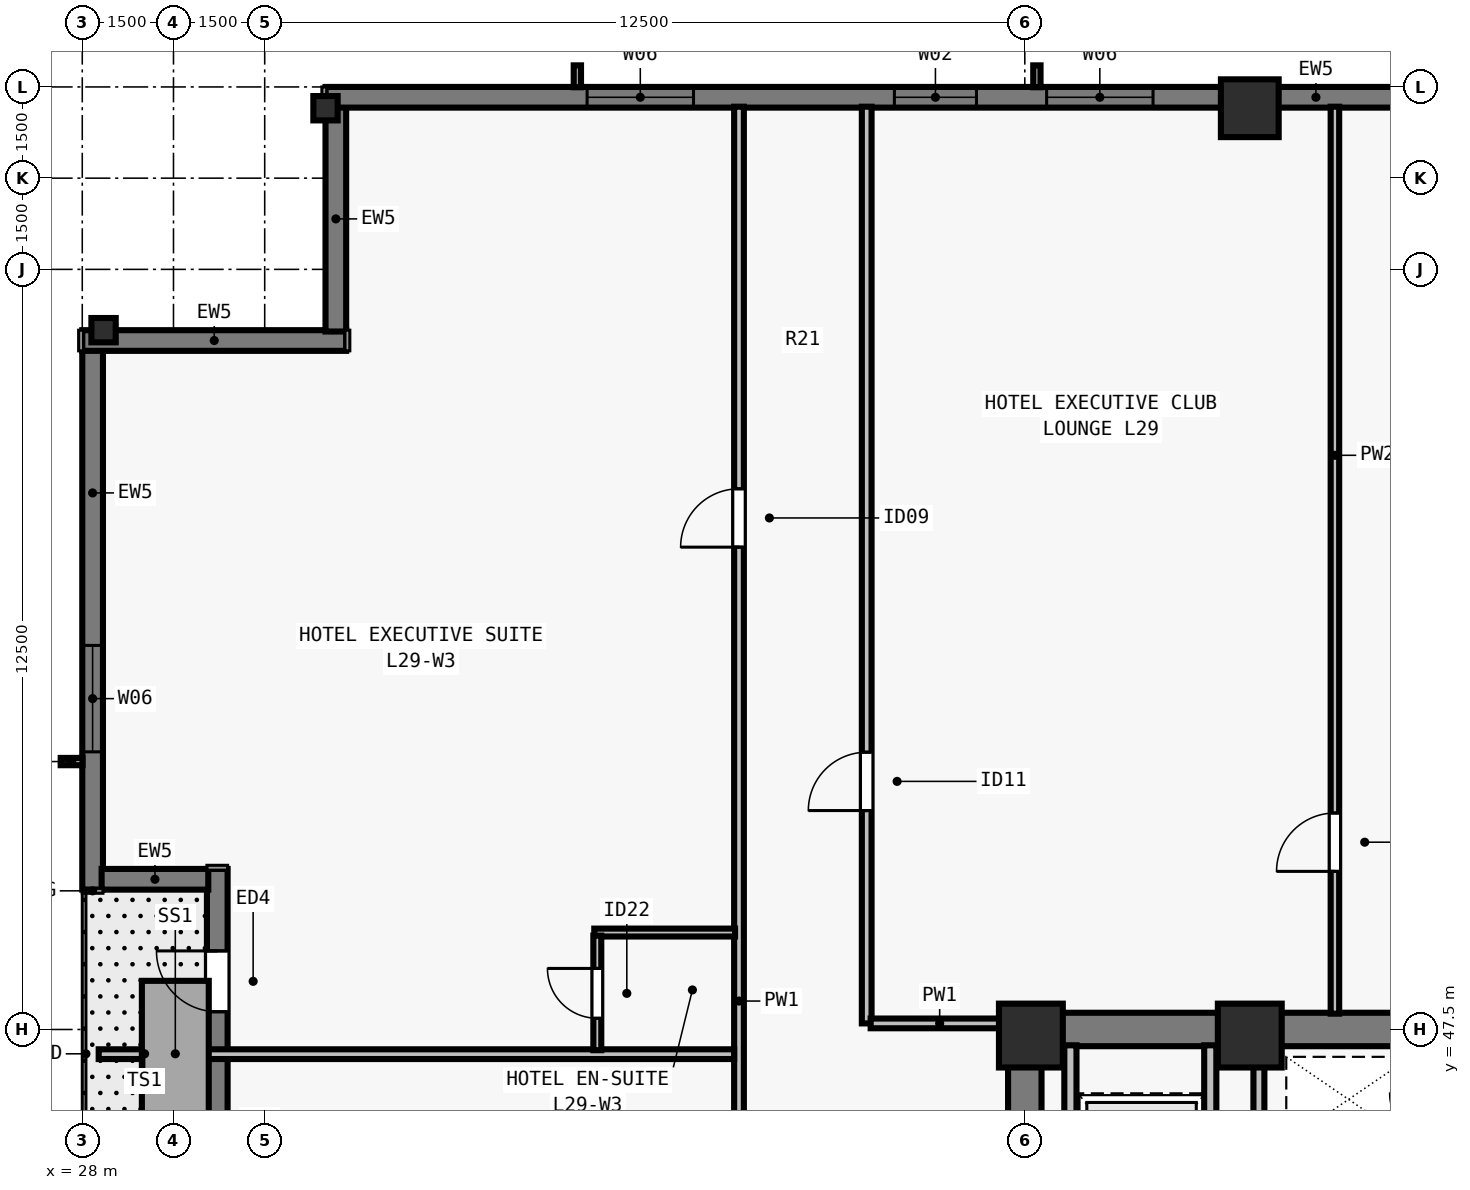
"""IFC4 building model, lengths in metres.
Left out: names, types, materials, properties, quantities, classifications, styles, units other than length and angle.
Written with IfcOpenShell. Run it as: python <this file> out.ifc"""

import sys

from ifc_helpers import new_model, si_unit, direction, frame, frame_2d, origin, origin_2d, place, context, subcontext, project, spatial, rectangle, i_section, extrude, element, fill, save


model = new_model("IFC4")
c1 = context("Model", 3, precision=1e-05, world=origin(), true_north=direction((0.0, 1.0)))
c2 = subcontext(c1, "Body", "Model", "MODEL_VIEW")
j1 = project(units=[si_unit("LENGTHUNIT", "METRE"), si_unit("PLANEANGLEUNIT", "RADIAN")], contexts=[c1])
p1 = place(None, origin())
s1 = spatial("IfcSite", under=j1, at=p1, CompositionType="ELEMENT")
p2 = place(p1, origin())
s2 = spatial("IfcBuilding", under=s1, at=p2, CompositionType="ELEMENT")
p3 = place(p2, frame((0.0, 0.0, 109.5)))
s3 = spatial("IfcBuildingStorey", under=s2, at=p3, CompositionType="ELEMENT", Elevation=109.5)
for number, where, z_axis, x_axis in (
    (1, (43.6, 47.4, 0.0), (0.0, 0.0, 1.0), (1.0, 0.0, 0.0)),
    (2, (47.2, 47.4, 0.0), (0.0, 0.0, 1.0), (1.0, 0.0, 0.0)),
):
    element("IfcColumn", number, at=place(p3, frame(where, z_axis=z_axis, x_axis=x_axis)), inside=s3, PredefinedType="COLUMN", context=c2, shape_type="SweptSolid", body=[
        extrude(rectangle(XDim=1.05, YDim=1.05, at=origin_2d()), origin(), (0.0, 0.0, 1.0), 3.5),
    ])
p4 = place(p3, frame((47.2, 62.65, 0.0), z_axis=(0.0, 0.0, 1.0), x_axis=(1.0, 0.0, 0.0)))
e3 = element("IfcColumn", 3, at=p4, inside=s3, PredefinedType="COLUMN", context=c2, shape_type="SweptSolid", body=[
    extrude(rectangle(XDim=0.95, YDim=0.95, at=origin_2d()), origin(), (0.0, 0.0, 1.0), 3.5),
])
for number, where, z_axis, x_axis in (
    (4, (32.0, 62.65, 0.0), (0.0, 0.0, 1.0), (1.0, 0.0, 0.0)),
    (5, (28.35, 59.0, 0.0), (0.0, 0.0, 1.0), (0.0, 1.0, 0.0)),
):
    element("IfcColumn", number, at=place(p3, frame(where, z_axis=z_axis, x_axis=x_axis)), inside=s3, PredefinedType="COLUMN", context=c2, shape_type="SweptSolid", body=[
        extrude(i_section(OverallWidth=0.4, OverallDepth=0.4, WebThickness=0.022, FlangeThickness=0.036, at=origin_2d()), origin(), (0.0, 0.0, 1.0), 3.5),
    ])
p5 = place(p3, frame((28.17, 49.8, 0.0), z_axis=(0.0, 0.0, 1.0), x_axis=(0.0, 1.0, 0.0)))
e6 = element("IfcWall", 6, at=p5, inside=s3, PredefinedType="SOLIDWALL", context=c2, shape_type="SweptSolid", body=[
    extrude(rectangle(XDim=8.882, YDim=0.34, at=frame_2d((4.441, 0.0))), origin(), (0.0, 0.0, 1.0), 3.28),
])
p6 = place(p5, frame((2.266, 0.0, 0.8)))
e7 = element("IfcOpeningElement", 7, at=p6, cuts=e6, PredefinedType="OPENING", context=c2, shape_type="SweptSolid", body=[
    extrude(rectangle(XDim=1.75, YDim=1.66, at=frame_2d((0.875, 0.83))), frame((0.0, 0.18, 0.0), z_axis=(0.0, -1.0, 0.0), x_axis=(1.0, 0.0, 0.0)), (0.0, 0.0, 1.0), 0.36),
])
p7 = place(p3, frame((28.0, 58.83, 0.0), z_axis=(0.0, 0.0, 1.0), x_axis=(1.0, 0.0, 0.0)))
e8 = element("IfcWall", 8, at=p7, inside=s3, PredefinedType="SOLIDWALL", context=c2, shape_type="SweptSolid", body=[
    extrude(rectangle(XDim=4.34, YDim=0.34, at=frame_2d((2.17, 0.0))), origin(), (0.0, 0.0, 1.0), 3.28),
])
p8 = place(p3, frame((32.17, 58.978, 0.0), z_axis=(0.0, 0.0, 1.0), x_axis=(0.0, 1.0, 0.0)))
e9 = element("IfcWall", 9, at=p8, inside=s3, PredefinedType="SOLIDWALL", context=c2, shape_type="SweptSolid", body=[
    extrude(rectangle(XDim=3.704, YDim=0.34, at=frame_2d((1.852, 0.0))), origin(), (0.0, 0.0, 1.0), 3.28),
])
p9 = place(p3, frame((32.0, 62.83, 0.0), z_axis=(0.0, 0.0, 1.0), x_axis=(1.0, 0.0, 0.0)))
e10 = element("IfcWall", 10, at=p9, inside=s3, PredefinedType="SOLIDWALL", context=c2, shape_type="SweptSolid", body=[
    extrude(rectangle(XDim=39.682, YDim=0.34, at=frame_2d((19.841, 0.0))), origin(), (0.0, 0.0, 1.0), 3.28),
])
p10 = place(p9, frame((4.302, 0.0, 0.8)))
e11 = element("IfcOpeningElement", 11, at=p10, cuts=e10, PredefinedType="OPENING", context=c2, shape_type="SweptSolid", body=[
    extrude(rectangle(XDim=1.75, YDim=1.66, at=frame_2d((0.875, 0.83))), frame((0.0, 0.18, 0.0), z_axis=(0.0, -1.0, 0.0), x_axis=(1.0, 0.0, 0.0)), (0.0, 0.0, 1.0), 0.36),
])
p11 = place(p9, frame((9.355, 0.0, 0.8)))
e12 = element("IfcOpeningElement", 12, at=p11, cuts=e10, PredefinedType="OPENING", context=c2, shape_type="SweptSolid", body=[
    extrude(rectangle(XDim=1.35, YDim=1.66, at=frame_2d((0.675, 0.83))), frame((0.0, 0.18, 0.0), z_axis=(0.0, -1.0, 0.0), x_axis=(1.0, 0.0, 0.0)), (0.0, 0.0, 1.0), 0.36),
])
p12 = place(p9, frame((11.859, 0.0, 0.8)))
e13 = element("IfcOpeningElement", 13, at=p12, cuts=e10, PredefinedType="OPENING", context=c2, shape_type="SweptSolid", body=[
    extrude(rectangle(XDim=1.75, YDim=1.66, at=frame_2d((0.875, 0.83))), frame((0.0, 0.18, 0.0), z_axis=(0.0, -1.0, 0.0), x_axis=(1.0, 0.0, 0.0)), (0.0, 0.0, 1.0), 0.36),
])
p13 = place(p9, frame((18.966, 0.0, 0.8)))
e14 = element("IfcOpeningElement", 14, at=p13, cuts=e10, PredefinedType="OPENING", context=c2, shape_type="SweptSolid", body=[
    extrude(rectangle(XDim=1.75, YDim=1.66, at=frame_2d((0.875, 0.83))), frame((0.0, 0.18, 0.0), z_axis=(0.0, -1.0, 0.0), x_axis=(1.0, 0.0, 0.0)), (0.0, 0.0, 1.0), 0.36),
])
p14 = place(p9, frame((21.469, 0.0, 0.8)))
e15 = element("IfcOpeningElement", 15, at=p14, cuts=e10, PredefinedType="OPENING", context=c2, shape_type="SweptSolid", body=[
    extrude(rectangle(XDim=1.35, YDim=1.66, at=frame_2d((0.675, 0.83))), frame((0.0, 0.18, 0.0), z_axis=(0.0, -1.0, 0.0), x_axis=(1.0, 0.0, 0.0)), (0.0, 0.0, 1.0), 0.36),
])
p15 = place(p9, frame((26.073, 0.0, 0.8)))
e16 = element("IfcOpeningElement", 16, at=p15, cuts=e10, PredefinedType="OPENING", context=c2, shape_type="SweptSolid", body=[
    extrude(rectangle(XDim=1.75, YDim=1.66, at=frame_2d((0.875, 0.83))), frame((0.0, 0.18, 0.0), z_axis=(0.0, -1.0, 0.0), x_axis=(1.0, 0.0, 0.0)), (0.0, 0.0, 1.0), 0.36),
])
p16 = place(p9, frame((29.377, 0.0, 0.8)))
e17 = element("IfcOpeningElement", 17, at=p16, cuts=e10, PredefinedType="OPENING", context=c2, shape_type="SweptSolid", body=[
    extrude(rectangle(XDim=1.35, YDim=1.66, at=frame_2d((0.675, 0.83))), frame((0.0, 0.18, 0.0), z_axis=(0.0, -1.0, 0.0), x_axis=(1.0, 0.0, 0.0)), (0.0, 0.0, 1.0), 0.36),
])
p17 = place(p9, frame((33.63, 0.0, 0.8)))
e18 = element("IfcOpeningElement", 18, at=p17, cuts=e10, PredefinedType="OPENING", context=c2, shape_type="SweptSolid", body=[
    extrude(rectangle(XDim=1.75, YDim=1.66, at=frame_2d((0.875, 0.83))), frame((0.0, 0.18, 0.0), z_axis=(0.0, -1.0, 0.0), x_axis=(1.0, 0.0, 0.0)), (0.0, 0.0, 1.0), 0.36),
])
p18 = place(p3, frame((30.22, 44.378, 0.0), z_axis=(0.0, 0.0, 1.0), x_axis=(0.0, 1.0, 0.0)))
e19 = element("IfcWall", 19, at=p18, inside=s3, PredefinedType="SOLIDWALL", context=c2, shape_type="SweptSolid", body=[
    extrude(rectangle(XDim=5.762, YDim=0.34, at=frame_2d((2.881, 0.0))), origin(), (0.0, 0.0, 1.0), 3.28),
])
p19 = place(p18, frame((3.414, 0.0, 0.0)))
e20 = element("IfcOpeningElement", 20, at=p19, cuts=e19, PredefinedType="OPENING", context=c2, shape_type="SweptSolid", body=[
    extrude(rectangle(XDim=1.0, YDim=2.15, at=frame_2d((0.5, 1.075))), frame((0.0, 0.18, 0.0), z_axis=(0.0, -1.0, 0.0), x_axis=(1.0, 0.0, 0.0)), (0.0, 0.0, 1.0), 0.36),
])
p20 = place(p3, frame((30.072, 49.97, 0.0), z_axis=(0.0, 0.0, 1.0), x_axis=(-1.0, 0.0, 0.0)))
e21 = element("IfcWall", 21, at=p20, inside=s3, PredefinedType="SOLIDWALL", context=c2, shape_type="SweptSolid", body=[
    extrude(rectangle(XDim=1.754, YDim=0.34, at=frame_2d((0.877, 0.0))), origin(), (0.0, 0.0, 1.0), 3.28),
])
p21 = place(p3, frame((43.225, 47.5, 0.0), z_axis=(0.0, 0.0, 1.0), x_axis=(1.0, 0.0, 0.0)))
e22 = element("IfcWall", 22, at=p21, inside=s3, PredefinedType="SHEAR", context=c2, shape_type="SweptSolid", body=[
    extrude(rectangle(XDim=17.55, YDim=0.55, at=frame_2d((8.775, 0.0))), origin(), (0.0, 0.0, 1.0), 3.28),
])
p22 = place(p3, frame((43.5, 40.8, 0.0), z_axis=(0.0, 0.0, 1.0), x_axis=(0.0, 1.0, 0.0)))
e23 = element("IfcWall", 23, at=p22, inside=s3, PredefinedType="SHEAR", context=c2, shape_type="SweptSolid", body=[
    extrude(rectangle(XDim=6.435, YDim=0.55, at=frame_2d((3.218, 0.0))), origin(), (0.0, 0.0, 1.0), 3.28),
])
for number, where, z_axis, x_axis in (
    (24, (46.55, 43.735, 0.0), (0.0, 0.0, 1.0), (0.0, 1.0, 0.0)),
    (25, (44.25, 43.735, 0.0), (0.0, 0.0, 1.0), (0.0, 1.0, 0.0)),
):
    element("IfcWall", number, at=place(p3, frame(where, z_axis=z_axis, x_axis=x_axis)), inside=s3, PredefinedType="SOLIDWALL", context=c2, shape_type="SweptSolid", body=[
        extrude(rectangle(XDim=3.505, YDim=0.2, at=frame_2d((1.752, 0.0))), origin(), (0.0, 0.0, 1.0), 3.28),
    ])
p23 = place(p3, frame((47.35, 43.735, 0.0), z_axis=(0.0, 0.0, 1.0), x_axis=(0.0, 1.0, 0.0)))
e26 = element("IfcWall", 26, at=p23, inside=s3, PredefinedType="SOLIDWALL", context=c2, shape_type="SweptSolid", body=[
    extrude(rectangle(XDim=3.505, YDim=0.18, at=frame_2d((1.752, 0.0))), origin(), (0.0, 0.0, 1.0), 3.28),
])
p24 = place(p3, frame((38.8, 15.325, 0.0), z_axis=(0.0, 0.0, 1.0), x_axis=(0.0, 1.0, 0.0)))
e27 = element("IfcWall", 27, at=p24, inside=s3, PredefinedType="PARTITIONING", context=c2, shape_type="SweptSolid", body=[
    extrude(rectangle(XDim=47.35, YDim=0.16, at=frame_2d((23.675, 0.0))), origin(), (0.0, 0.0, 1.0), 2.555),
])
p25 = place(p24, frame((8.606, 0.0, 0.0)))
e28 = element("IfcOpeningElement", 28, at=p25, cuts=e27, PredefinedType="OPENING", context=c2, shape_type="SweptSolid", body=[
    extrude(rectangle(XDim=0.96, YDim=2.15, at=frame_2d((0.48, 1.075))), frame((0.0, 0.09, 0.0), z_axis=(0.0, -1.0, 0.0), x_axis=(1.0, 0.0, 0.0)), (0.0, 0.0, 1.0), 0.18),
])
p26 = place(p24, frame((24.218, 0.0, 0.0)))
e29 = element("IfcOpeningElement", 29, at=p26, cuts=e27, PredefinedType="OPENING", context=c2, shape_type="SweptSolid", body=[
    extrude(rectangle(XDim=0.96, YDim=2.15, at=frame_2d((0.48, 1.075))), frame((0.0, 0.09, 0.0), z_axis=(0.0, -1.0, 0.0), x_axis=(1.0, 0.0, 0.0)), (0.0, 0.0, 1.0), 0.18),
])
p27 = place(p24, frame((40.107, 0.0, 0.0)))
e30 = element("IfcOpeningElement", 30, at=p27, cuts=e27, PredefinedType="OPENING", context=c2, shape_type="SweptSolid", body=[
    extrude(rectangle(XDim=0.96, YDim=2.15, at=frame_2d((0.48, 1.075))), frame((0.0, 0.09, 0.0), z_axis=(0.0, -1.0, 0.0), x_axis=(1.0, 0.0, 0.0)), (0.0, 0.0, 1.0), 0.18),
])
p28 = place(p3, frame((40.9, 47.6, 0.0), z_axis=(0.0, 0.0, 1.0), x_axis=(0.0, 1.0, 0.0)))
e31 = element("IfcWall", 31, at=p28, inside=s3, PredefinedType="PARTITIONING", context=c2, shape_type="SweptSolid", body=[
    extrude(rectangle(XDim=15.075, YDim=0.16, at=frame_2d((7.538, 0.0))), origin(), (0.0, 0.0, 1.0), 2.555),
])
p29 = place(p28, frame((3.5, 0.0, 0.0)))
e32 = element("IfcOpeningElement", 32, at=p29, cuts=e31, PredefinedType="OPENING", context=c2, shape_type="SweptSolid", body=[
    extrude(rectangle(XDim=0.96, YDim=2.12, at=frame_2d((0.48, 1.06))), frame((0.0, 0.09, 0.0), z_axis=(0.0, -1.0, 0.0), x_axis=(1.0, 0.0, 0.0)), (0.0, 0.0, 1.0), 0.18),
])
p30 = place(p3, frame((40.965, 47.6, 0.0), z_axis=(0.0, 0.0, 1.0), x_axis=(1.0, 0.0, 0.0)))
e33 = element("IfcWall", 33, at=p30, inside=s3, PredefinedType="PARTITIONING", context=c2, shape_type="SweptSolid", body=[
    extrude(rectangle(XDim=2.27, YDim=0.16, at=frame_2d((1.135, 0.0))), origin(), (0.0, 0.0, 1.0), 3.28),
])
p31 = place(p3, frame((48.6, 47.76, 0.0), z_axis=(0.0, 0.0, 1.0), x_axis=(0.0, 1.0, 0.0)))
e34 = element("IfcWall", 34, at=p31, inside=s3, PredefinedType="PARTITIONING", context=c2, shape_type="SweptSolid", body=[
    extrude(rectangle(XDim=14.915, YDim=0.14, at=frame_2d((7.458, 0.0))), origin(), (0.0, 0.0, 1.0), 2.896),
])
p32 = place(p31, frame((2.34, 0.0, 0.0)))
e35 = element("IfcOpeningElement", 35, at=p32, cuts=e34, PredefinedType="OPENING", context=c2, shape_type="SweptSolid", body=[
    extrude(rectangle(XDim=0.96, YDim=2.12, at=frame_2d((0.48, 1.06))), frame((0.0, 0.08, 0.0), z_axis=(0.0, -1.0, 0.0), x_axis=(1.0, 0.0, 0.0)), (0.0, 0.0, 1.0), 0.16),
])
p33 = place(p3, frame((28.27, 47.094, 0.0), z_axis=(0.0, 0.0, 1.0), x_axis=(1.0, 0.0, 0.0)))
e36 = element("IfcWall", 36, at=p33, inside=s3, PredefinedType="PARTITIONING", context=c2, shape_type="SweptSolid", body=[
    extrude(rectangle(XDim=10.45, YDim=0.16, at=frame_2d((5.225, 0.0))), origin(), (0.0, 0.0, 1.0), 3.28),
])
p34 = place(p3, frame((36.42, 49.094, 0.0), z_axis=(0.0, 0.0, 1.0), x_axis=(1.0, 0.0, 0.0)))
e37 = element("IfcWall", 37, at=p34, inside=s3, PredefinedType="PLUMBINGWALL", context=c2, shape_type="SweptSolid", body=[
    extrude(rectangle(XDim=2.315, YDim=0.13, at=frame_2d((1.158, 0.0))), origin(), (0.0, 0.0, 1.0), 3.28),
])
p35 = place(p3, frame((36.47, 47.159, 0.0), z_axis=(0.0, 0.0, 1.0), x_axis=(0.0, 1.0, 0.0)))
e38 = element("IfcWall", 38, at=p35, inside=s3, PredefinedType="PLUMBINGWALL", context=c2, shape_type="SweptSolid", body=[
    extrude(rectangle(XDim=1.885, YDim=0.13, at=frame_2d((0.942, 0.0))), origin(), (0.0, 0.0, 1.0), 3.28),
])
p36 = place(p35, frame((0.525, 0.0, 0.0)))
e39 = element("IfcOpeningElement", 39, at=p36, cuts=e38, PredefinedType="OPENING", context=c2, shape_type="SweptSolid", body=[
    extrude(rectangle(XDim=0.82, YDim=2.1, at=frame_2d((0.41, 1.05))), frame((0.0, 0.075, 0.0), z_axis=(0.0, -1.0, 0.0), x_axis=(1.0, 0.0, 0.0)), (0.0, 0.0, 1.0), 0.15),
])
p37 = place(p6, origin())
e40 = element("IfcWindow", 40, at=p37, inside=s3, PartitioningType="SINGLE_PANEL", PredefinedType="WINDOW", context=c2, shape_type="SweptSolid", body=[
    extrude(rectangle(XDim=1.75, YDim=1.66, at=frame_2d((0.875, 0.83))), frame((0.0, -0.05, 0.0), z_axis=(0.0, -1.0, 0.0), x_axis=(1.0, 0.0, 0.0)), (0.0, 0.0, 1.0), 0.06),
])
fill(e7, e40)
p38 = place(p10, origin())
e41 = element("IfcWindow", 41, at=p38, inside=s3, PartitioningType="SINGLE_PANEL", PredefinedType="WINDOW", context=c2, shape_type="SweptSolid", body=[
    extrude(rectangle(XDim=1.75, YDim=1.66, at=frame_2d((0.875, 0.83))), frame((0.0, -0.05, 0.0), z_axis=(0.0, -1.0, 0.0), x_axis=(1.0, 0.0, 0.0)), (0.0, 0.0, 1.0), 0.06),
])
fill(e11, e41)
p39 = place(p11, origin())
e42 = element("IfcWindow", 42, at=p39, inside=s3, PartitioningType="SINGLE_PANEL", PredefinedType="WINDOW", context=c2, shape_type="SweptSolid", body=[
    extrude(rectangle(XDim=1.35, YDim=1.66, at=frame_2d((0.675, 0.83))), frame((0.0, -0.05, 0.0), z_axis=(0.0, -1.0, 0.0), x_axis=(1.0, 0.0, 0.0)), (0.0, 0.0, 1.0), 0.06),
])
fill(e12, e42)
p40 = place(p12, origin())
e43 = element("IfcWindow", 43, at=p40, inside=s3, PartitioningType="SINGLE_PANEL", PredefinedType="WINDOW", context=c2, shape_type="SweptSolid", body=[
    extrude(rectangle(XDim=1.75, YDim=1.66, at=frame_2d((0.875, 0.83))), frame((0.0, -0.05, 0.0), z_axis=(0.0, -1.0, 0.0), x_axis=(1.0, 0.0, 0.0)), (0.0, 0.0, 1.0), 0.06),
])
fill(e13, e43)
p41 = place(p19, origin())
e44 = element("IfcDoor", 44, at=p41, inside=s3, OperationType="SINGLE_SWING_RIGHT", PredefinedType="DOOR", context=c2, shape_type="SweptSolid", body=[
    extrude(rectangle(XDim=1.0, YDim=2.15, at=frame_2d((0.5, 1.075))), frame((0.0, 0.025, 0.0), z_axis=(0.0, -1.0, 0.0), x_axis=(1.0, 0.0, 0.0)), (0.0, 0.0, 1.0), 0.05),
])
fill(e20, e44)
p42 = place(p29, origin())
e45 = element("IfcDoor", 45, at=p42, inside=s3, OperationType="SINGLE_SWING_LEFT", PredefinedType="DOOR", context=c2, shape_type="SweptSolid", body=[
    extrude(rectangle(XDim=0.96, YDim=2.12, at=frame_2d((0.48, 1.06))), frame((0.0, 0.025, 0.0), z_axis=(0.0, -1.0, 0.0), x_axis=(1.0, 0.0, 0.0)), (0.0, 0.0, 1.0), 0.05),
])
fill(e32, e45)
p43 = place(p32, origin())
e46 = element("IfcDoor", 46, at=p43, inside=s3, OperationType="SINGLE_SWING_LEFT", PredefinedType="DOOR", context=c2, shape_type="SweptSolid", body=[
    extrude(rectangle(XDim=0.96, YDim=2.12, at=frame_2d((0.48, 1.06))), frame((0.0, 0.025, 0.0), z_axis=(0.0, -1.0, 0.0), x_axis=(1.0, 0.0, 0.0)), (0.0, 0.0, 1.0), 0.05),
])
fill(e35, e46)
p44 = place(p36, origin())
e47 = element("IfcDoor", 47, at=p44, inside=s3, OperationType="SINGLE_SWING_RIGHT", PredefinedType="DOOR", context=c2, shape_type="SweptSolid", body=[
    extrude(rectangle(XDim=0.82, YDim=2.1, at=frame_2d((0.41, 1.05))), frame((0.0, 0.025, 0.0), z_axis=(0.0, -1.0, 0.0), x_axis=(1.0, 0.0, 0.0)), (0.0, 0.0, 1.0), 0.05),
])
fill(e39, e47)
p45 = place(p27, origin())
e48 = element("IfcDoor", 48, at=p45, inside=s3, OperationType="SINGLE_SWING_LEFT", PredefinedType="DOOR", context=c2, shape_type="SweptSolid", body=[
    extrude(rectangle(XDim=0.96, YDim=2.15, at=frame_2d((0.48, 1.075))), frame((0.0, 0.025, 0.0), z_axis=(0.0, -1.0, 0.0), x_axis=(1.0, 0.0, 0.0)), (0.0, 0.0, 1.0), 0.05),
])
fill(e30, e48)
save(model, sys.argv[1])
